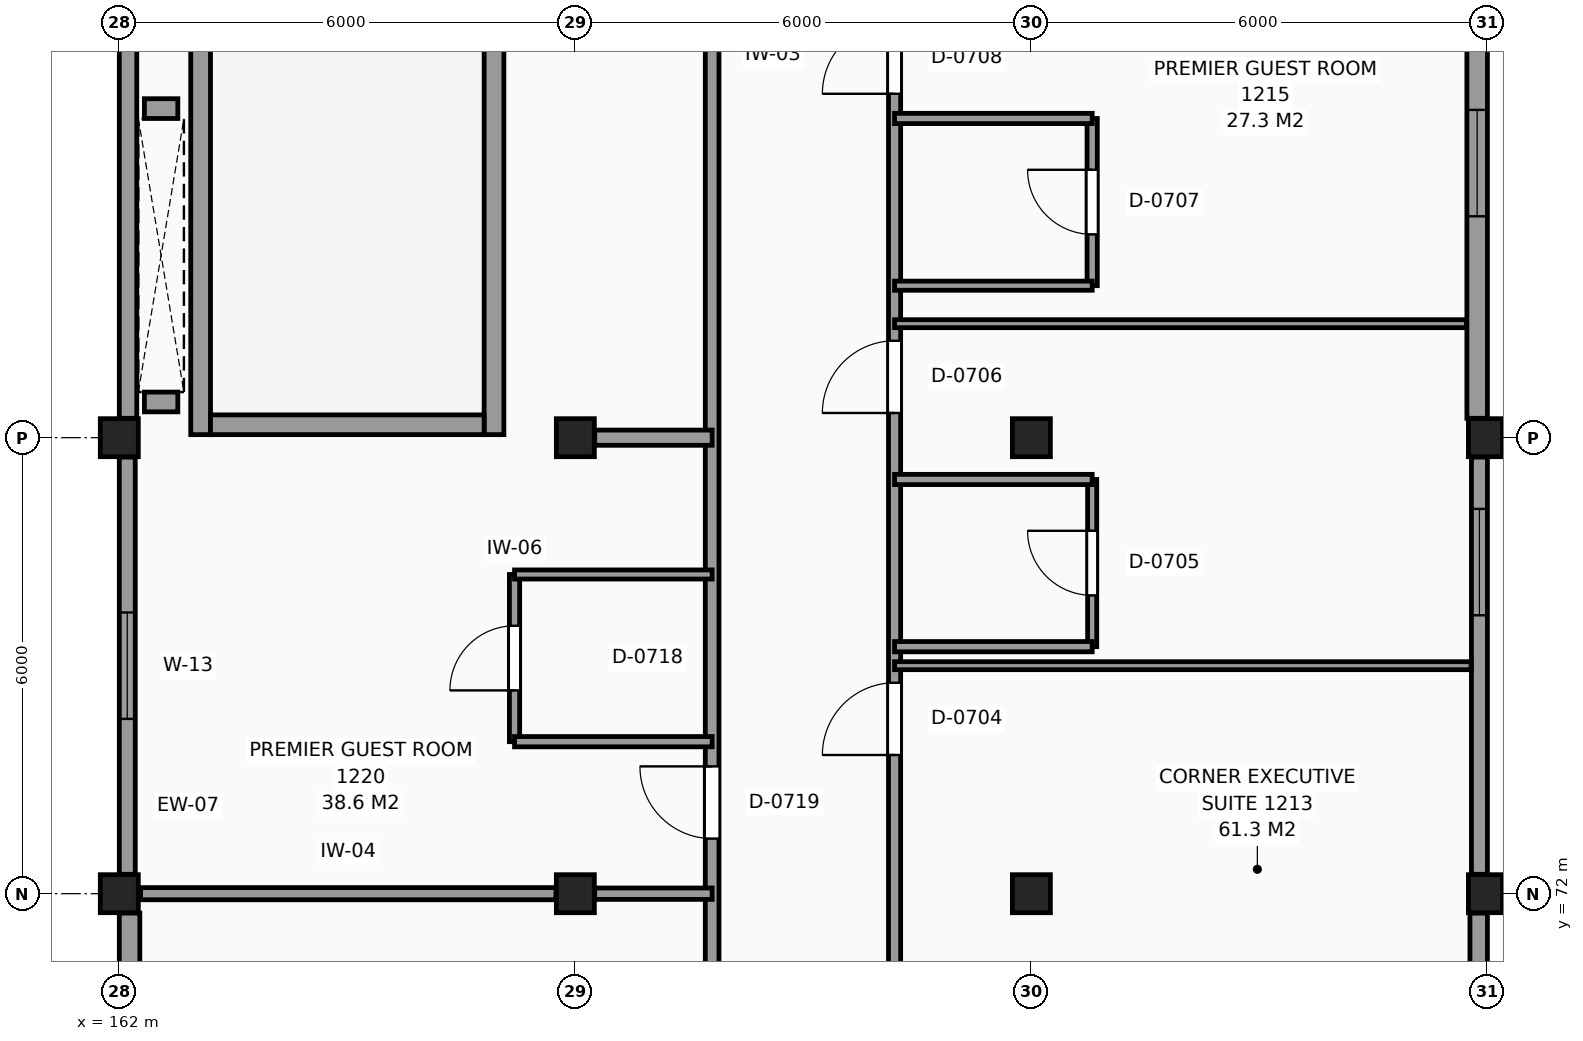
"""IFC4 building model, lengths in metres.
Left out: names, types, materials, properties, quantities, classifications, styles, units other than length and angle.
Written with IfcOpenShell. Run it as: python <this file> out.ifc"""

import sys

from ifc_helpers import new_model, si_unit, direction, frame, frame_2d, origin, origin_2d, place, context, subcontext, project, spatial, rectangle, extrude, element, fill, save


model = new_model("IFC4")
c1 = context("Model", 3, precision=1e-05, world=origin(), true_north=direction((0.0, 1.0)))
c2 = subcontext(c1, "Body", "Model", "MODEL_VIEW")
j1 = project(units=[si_unit("LENGTHUNIT", "METRE"), si_unit("PLANEANGLEUNIT", "RADIAN")], contexts=[c1])
p1 = place(None, origin())
s1 = spatial("IfcSite", under=j1, at=p1, CompositionType="ELEMENT")
p2 = place(p1, origin())
s2 = spatial("IfcBuilding", under=s1, at=p2, CompositionType="ELEMENT")
p3 = place(p2, frame((0.0, 0.0, 48.0)))
s3 = spatial("IfcBuildingStorey", under=s2, at=p3, CompositionType="ELEMENT", Elevation=48.0)
for number, where, z_axis, x_axis in (
    (1, (162.0, 72.0, 0.0), (0.0, 0.0, 1.0), (1.0, 0.0, 0.0)),
    (2, (162.0, 78.0, 0.0), (0.0, 0.0, 1.0), (1.0, 0.0, 0.0)),
    (3, (168.0, 72.0, 0.0), (0.0, 0.0, 1.0), (1.0, 0.0, 0.0)),
    (4, (168.0, 78.0, 0.0), (0.0, 0.0, 1.0), (1.0, 0.0, 0.0)),
    (5, (174.0, 72.0, 0.0), (0.0, 0.0, 1.0), (1.0, 0.0, 0.0)),
    (6, (174.0, 78.0, 0.0), (0.0, 0.0, 1.0), (1.0, 0.0, 0.0)),
    (7, (180.0, 72.0, 0.0), (0.0, 0.0, 1.0), (1.0, 0.0, 0.0)),
    (8, (180.0, 78.0, 0.0), (0.0, 0.0, 1.0), (1.0, 0.0, 0.0)),
):
    element("IfcColumn", number, at=place(p3, frame(where, z_axis=z_axis, x_axis=x_axis)), inside=s3, PredefinedType="COLUMN", context=c2, shape_type="SweptSolid", body=[
        extrude(rectangle(XDim=0.5, YDim=0.5, at=origin_2d()), origin(), (0.0, 0.0, 1.0), 3.3),
    ])
p4 = place(p3, frame((179.885, 66.255, 0.0), z_axis=(0.0, 0.0, 1.0), x_axis=(0.0, 1.0, 0.0)))
e9 = element("IfcWall", 9, at=p4, inside=s3, PredefinedType="SOLIDWALL", context=c2, shape_type="SweptSolid", body=[
    extrude(rectangle(XDim=5.49, YDim=0.23, at=frame_2d((2.745, 0.0))), origin(), (0.0, 0.0, 1.0), 2.4),
])
p5 = place(p4, frame((2.045, 0.0, 0.8)))
e10 = element("IfcOpeningElement", 10, at=p5, cuts=e9, PredefinedType="OPENING", context=c2, shape_type="SweptSolid", body=[
    extrude(rectangle(XDim=1.4, YDim=1.4, at=frame_2d((0.7, 0.7))), frame((0.0, 0.125, 0.0), z_axis=(0.0, -1.0, 0.0), x_axis=(1.0, 0.0, 0.0)), (0.0, 0.0, 1.0), 0.25),
])
p6 = place(p3, frame((179.895, 72.255, 0.0), z_axis=(0.0, 0.0, 1.0), x_axis=(0.0, 1.0, 0.0)))
e11 = element("IfcWall", 11, at=p6, inside=s3, PredefinedType="SOLIDWALL", context=c2, shape_type="SweptSolid", body=[
    extrude(rectangle(XDim=5.49, YDim=0.21, at=frame_2d((2.745, 0.0))), origin(), (0.0, 0.0, 1.0), 2.4),
])
p7 = place(p6, frame((3.408, 0.0, 0.8)))
e12 = element("IfcOpeningElement", 12, at=p7, cuts=e11, PredefinedType="OPENING", context=c2, shape_type="SweptSolid", body=[
    extrude(rectangle(XDim=1.4, YDim=1.4, at=frame_2d((0.7, 0.7))), frame((0.0, 0.115, 0.0), z_axis=(0.0, -1.0, 0.0), x_axis=(1.0, 0.0, 0.0)), (0.0, 0.0, 1.0), 0.23),
])
p8 = place(p3, frame((179.865, 78.255, 0.0), z_axis=(0.0, 0.0, 1.0), x_axis=(0.0, 1.0, 0.0)))
e13 = element("IfcWall", 13, at=p8, inside=s3, PredefinedType="SOLIDWALL", context=c2, shape_type="SweptSolid", body=[
    extrude(rectangle(XDim=5.49, YDim=0.27, at=frame_2d((2.745, 0.0))), origin(), (0.0, 0.0, 1.0), 2.4),
])
p9 = place(p8, frame((2.658, 0.0, 0.8)))
e14 = element("IfcOpeningElement", 14, at=p9, cuts=e13, PredefinedType="OPENING", context=c2, shape_type="SweptSolid", body=[
    extrude(rectangle(XDim=1.4, YDim=1.4, at=frame_2d((0.7, 0.7))), frame((0.0, 0.145, 0.0), z_axis=(0.0, -1.0, 0.0), x_axis=(1.0, 0.0, 0.0)), (0.0, 0.0, 1.0), 0.29),
])
p10 = place(p3, frame((162.115, 83.745, 0.0), z_axis=(0.0, 0.0, 1.0), x_axis=(0.0, -1.0, 0.0)))
e15 = element("IfcWall", 15, at=p10, inside=s3, PredefinedType="SOLIDWALL", context=c2, shape_type="SweptSolid", body=[
    extrude(rectangle(XDim=5.49, YDim=0.23, at=frame_2d((2.745, 0.0))), origin(), (0.0, 0.0, 1.0), 3.05),
])
p11 = place(p3, frame((162.105, 77.745, 0.0), z_axis=(0.0, 0.0, 1.0), x_axis=(0.0, -1.0, 0.0)))
e16 = element("IfcWall", 16, at=p11, inside=s3, PredefinedType="SOLIDWALL", context=c2, shape_type="SweptSolid", body=[
    extrude(rectangle(XDim=5.49, YDim=0.21, at=frame_2d((2.745, 0.0))), origin(), (0.0, 0.0, 1.0), 2.4),
])
p12 = place(p11, frame((2.045, 0.0, 0.8)))
e17 = element("IfcOpeningElement", 17, at=p12, cuts=e16, PredefinedType="OPENING", context=c2, shape_type="SweptSolid", body=[
    extrude(rectangle(XDim=1.4, YDim=1.4, at=frame_2d((0.7, 0.7))), frame((0.0, 0.115, 0.0), z_axis=(0.0, -1.0, 0.0), x_axis=(1.0, 0.0, 0.0)), (0.0, 0.0, 1.0), 0.23),
])
p13 = place(p3, frame((162.135, 71.745, 0.0), z_axis=(0.0, 0.0, 1.0), x_axis=(0.0, -1.0, 0.0)))
e18 = element("IfcWall", 18, at=p13, inside=s3, PredefinedType="SOLIDWALL", context=c2, shape_type="SweptSolid", body=[
    extrude(rectangle(XDim=5.49, YDim=0.27, at=frame_2d((2.745, 0.0))), origin(), (0.0, 0.0, 1.0), 2.4),
])
p14 = place(p13, frame((2.045, 0.0, 0.8)))
e19 = element("IfcOpeningElement", 19, at=p14, cuts=e18, PredefinedType="OPENING", context=c2, shape_type="SweptSolid", body=[
    extrude(rectangle(XDim=1.4, YDim=1.4, at=frame_2d((0.7, 0.7))), frame((0.0, 0.145, 0.0), z_axis=(0.0, -1.0, 0.0), x_axis=(1.0, 0.0, 0.0)), (0.0, 0.0, 1.0), 0.29),
])
for number, where, z_axis, x_axis in (
    (20, (163.07, 78.04, 0.0), (0.0, 0.0, 1.0), (0.0, 1.0, 0.0)),
    (21, (166.93, 78.04, 0.0), (0.0, 0.0, 1.0), (0.0, 1.0, 0.0)),
):
    element("IfcWall", number, at=place(p3, frame(where, z_axis=z_axis, x_axis=x_axis)), inside=s3, PredefinedType="SHEAR", context=c2, shape_type="SweptSolid", body=[
        extrude(rectangle(XDim=10.72, YDim=0.26, at=frame_2d((5.36, 0.0))), origin(), (0.0, 0.0, 1.0), 3.3),
    ])
p15 = place(p3, frame((163.2, 78.17, 0.0), z_axis=(0.0, 0.0, 1.0), x_axis=(1.0, 0.0, 0.0)))
e22 = element("IfcWall", 22, at=p15, inside=s3, PredefinedType="SHEAR", context=c2, shape_type="SweptSolid", body=[
    extrude(rectangle(XDim=3.6, YDim=0.26, at=frame_2d((1.8, 0.0))), origin(), (0.0, 0.0, 1.0), 3.3),
])
for number, where, z_axis, x_axis in (
    (23, (162.33, 78.47, 0.0), (0.0, 0.0, 1.0), (1.0, 0.0, 0.0)),
    (24, (162.33, 82.33, 0.0), (0.0, 0.0, 1.0), (1.0, 0.0, 0.0)),
):
    element("IfcWall", number, at=place(p3, frame(where, z_axis=z_axis, x_axis=x_axis)), inside=s3, PredefinedType="SHEAR", context=c2, shape_type="SweptSolid", body=[
        extrude(rectangle(XDim=0.44, YDim=0.26, at=frame_2d((0.22, 0.0))), origin(), (0.0, 0.0, 1.0), 3.3),
    ])
p16 = place(p3, frame((167.2, 74.0, 0.0), z_axis=(0.0, 0.0, 1.0), x_axis=(0.0, 1.0, 0.0)))
e25 = element("IfcWall", 25, at=p16, inside=s3, PredefinedType="PARTITIONING", context=c2, shape_type="SweptSolid", body=[
    extrude(rectangle(XDim=2.2, YDim=0.135, at=frame_2d((1.1, 0.0))), origin(), (0.0, 0.0, 1.0), 3.05),
])
p17 = place(p16, frame((0.675, 0.0, 0.0)))
e26 = element("IfcOpeningElement", 26, at=p17, cuts=e25, PredefinedType="OPENING", context=c2, shape_type="SweptSolid", body=[
    extrude(rectangle(XDim=0.85, YDim=2.1, at=frame_2d((0.425, 1.05))), frame((0.0, 0.078, 0.0), z_axis=(0.0, -1.0, 0.0), x_axis=(1.0, 0.0, 0.0)), (0.0, 0.0, 1.0), 0.155),
])
p18 = place(p3, frame((169.8, 66.235, 0.0), z_axis=(0.0, 0.0, 1.0), x_axis=(0.0, 1.0, 0.0)))
e27 = element("IfcWall", 27, at=p18, inside=s3, PredefinedType="PARTITIONING", context=c2, shape_type="SweptSolid", body=[
    extrude(rectangle(XDim=41.585, YDim=0.18, at=frame_2d((20.792, 0.0))), origin(), (0.0, 0.0, 1.0), 3.05),
])
p19 = place(p18, frame((26.165, 0.0, 0.0)))
e28 = element("IfcOpeningElement", 28, at=p19, cuts=e27, PredefinedType="OPENING", context=c2, shape_type="SweptSolid", body=[
    extrude(rectangle(XDim=1.2, YDim=2.2, at=frame_2d((0.6, 1.1))), frame((0.0, 0.1, 0.0), z_axis=(0.0, -1.0, 0.0), x_axis=(1.0, 0.0, 0.0)), (0.0, 0.0, 1.0), 0.2),
])
p20 = place(p18, frame((0.44, 0.0, 0.0)))
e29 = element("IfcOpeningElement", 29, at=p20, cuts=e27, PredefinedType="OPENING", context=c2, shape_type="SweptSolid", body=[
    extrude(rectangle(XDim=0.95, YDim=2.1, at=frame_2d((0.475, 1.05))), frame((0.0, 0.1, 0.0), z_axis=(0.0, -1.0, 0.0), x_axis=(1.0, 0.0, 0.0)), (0.0, 0.0, 1.0), 0.2),
])
p21 = place(p18, frame((6.49, 0.0, 0.0)))
e30 = element("IfcOpeningElement", 30, at=p21, cuts=e27, PredefinedType="OPENING", context=c2, shape_type="SweptSolid", body=[
    extrude(rectangle(XDim=0.95, YDim=2.1, at=frame_2d((0.475, 1.05))), frame((0.0, 0.1, 0.0), z_axis=(0.0, -1.0, 0.0), x_axis=(1.0, 0.0, 0.0)), (0.0, 0.0, 1.0), 0.2),
])
p22 = place(p18, frame((30.49, 0.0, 0.0)))
e31 = element("IfcOpeningElement", 31, at=p22, cuts=e27, PredefinedType="OPENING", context=c2, shape_type="SweptSolid", body=[
    extrude(rectangle(XDim=0.95, YDim=2.1, at=frame_2d((0.475, 1.05))), frame((0.0, 0.1, 0.0), z_axis=(0.0, -1.0, 0.0), x_axis=(1.0, 0.0, 0.0)), (0.0, 0.0, 1.0), 0.2),
])
p23 = place(p18, frame((36.49, 0.0, 0.0)))
e32 = element("IfcOpeningElement", 32, at=p23, cuts=e27, PredefinedType="OPENING", context=c2, shape_type="SweptSolid", body=[
    extrude(rectangle(XDim=0.95, YDim=2.1, at=frame_2d((0.475, 1.05))), frame((0.0, 0.1, 0.0), z_axis=(0.0, -1.0, 0.0), x_axis=(1.0, 0.0, 0.0)), (0.0, 0.0, 1.0), 0.2),
])
p24 = place(p3, frame((172.2, 66.235, 0.0), z_axis=(0.0, 0.0, 1.0), x_axis=(0.0, 1.0, 0.0)))
e33 = element("IfcWall", 33, at=p24, inside=s3, PredefinedType="PARTITIONING", context=c2, shape_type="SweptSolid", body=[
    extrude(rectangle(XDim=41.585, YDim=0.16, at=frame_2d((20.792, 0.0))), origin(), (0.0, 0.0, 1.0), 3.05),
])
p25 = place(p24, frame((7.59, 0.0, 0.0)))
e34 = element("IfcOpeningElement", 34, at=p25, cuts=e33, PredefinedType="OPENING", context=c2, shape_type="SweptSolid", body=[
    extrude(rectangle(XDim=0.95, YDim=2.1, at=frame_2d((0.475, 1.05))), frame((0.0, 0.09, 0.0), z_axis=(0.0, -1.0, 0.0), x_axis=(1.0, 0.0, 0.0)), (0.0, 0.0, 1.0), 0.18),
])
p26 = place(p24, frame((12.09, 0.0, 0.0)))
e35 = element("IfcOpeningElement", 35, at=p26, cuts=e33, PredefinedType="OPENING", context=c2, shape_type="SweptSolid", body=[
    extrude(rectangle(XDim=0.95, YDim=2.1, at=frame_2d((0.475, 1.05))), frame((0.0, 0.09, 0.0), z_axis=(0.0, -1.0, 0.0), x_axis=(1.0, 0.0, 0.0)), (0.0, 0.0, 1.0), 0.18),
])
p27 = place(p24, frame((16.29, 0.0, 0.0)))
e36 = element("IfcOpeningElement", 36, at=p27, cuts=e33, PredefinedType="OPENING", context=c2, shape_type="SweptSolid", body=[
    extrude(rectangle(XDim=0.95, YDim=2.1, at=frame_2d((0.475, 1.05))), frame((0.0, 0.09, 0.0), z_axis=(0.0, -1.0, 0.0), x_axis=(1.0, 0.0, 0.0)), (0.0, 0.0, 1.0), 0.18),
])
p28 = place(p24, frame((18.49, 0.0, 0.0)))
e37 = element("IfcOpeningElement", 37, at=p28, cuts=e33, PredefinedType="OPENING", context=c2, shape_type="SweptSolid", body=[
    extrude(rectangle(XDim=0.95, YDim=2.1, at=frame_2d((0.475, 1.05))), frame((0.0, 0.09, 0.0), z_axis=(0.0, -1.0, 0.0), x_axis=(1.0, 0.0, 0.0)), (0.0, 0.0, 1.0), 0.18),
])
p29 = place(p24, frame((24.49, 0.0, 0.0)))
e38 = element("IfcOpeningElement", 38, at=p29, cuts=e33, PredefinedType="OPENING", context=c2, shape_type="SweptSolid", body=[
    extrude(rectangle(XDim=0.95, YDim=2.1, at=frame_2d((0.475, 1.05))), frame((0.0, 0.09, 0.0), z_axis=(0.0, -1.0, 0.0), x_axis=(1.0, 0.0, 0.0)), (0.0, 0.0, 1.0), 0.18),
])
p30 = place(p24, frame((38.34, 0.0, 0.0)))
e39 = element("IfcOpeningElement", 39, at=p30, cuts=e33, PredefinedType="OPENING", context=c2, shape_type="SweptSolid", body=[
    extrude(rectangle(XDim=0.95, YDim=2.1, at=frame_2d((0.475, 1.05))), frame((0.0, 0.09, 0.0), z_axis=(0.0, -1.0, 0.0), x_axis=(1.0, 0.0, 0.0)), (0.0, 0.0, 1.0), 0.18),
])
p31 = place(p3, frame((174.8, 75.25, 0.0), z_axis=(0.0, 0.0, 1.0), x_axis=(0.0, 1.0, 0.0)))
e40 = element("IfcWall", 40, at=p31, inside=s3, PredefinedType="PARTITIONING", context=c2, shape_type="SweptSolid", body=[
    extrude(rectangle(XDim=2.2, YDim=0.12, at=frame_2d((1.1, 0.0))), origin(), (0.0, 0.0, 1.0), 3.05),
])
p32 = place(p31, frame((0.675, 0.0, 0.0)))
e41 = element("IfcOpeningElement", 41, at=p32, cuts=e40, PredefinedType="OPENING", context=c2, shape_type="SweptSolid", body=[
    extrude(rectangle(XDim=0.85, YDim=2.1, at=frame_2d((0.425, 1.05))), frame((0.0, 0.07, 0.0), z_axis=(0.0, -1.0, 0.0), x_axis=(1.0, 0.0, 0.0)), (0.0, 0.0, 1.0), 0.14),
])
p33 = place(p3, frame((174.8, 80.0, 0.0), z_axis=(0.0, 0.0, 1.0), x_axis=(0.0, 1.0, 0.0)))
e42 = element("IfcWall", 42, at=p33, inside=s3, PredefinedType="PARTITIONING", context=c2, shape_type="SweptSolid", body=[
    extrude(rectangle(XDim=2.2, YDim=0.135, at=frame_2d((1.1, 0.0))), origin(), (0.0, 0.0, 1.0), 3.05),
])
p34 = place(p33, frame((0.675, 0.0, 0.0)))
e43 = element("IfcOpeningElement", 43, at=p34, cuts=e42, PredefinedType="OPENING", context=c2, shape_type="SweptSolid", body=[
    extrude(rectangle(XDim=0.85, YDim=2.1, at=frame_2d((0.425, 1.05))), frame((0.0, 0.078, 0.0), z_axis=(0.0, -1.0, 0.0), x_axis=(1.0, 0.0, 0.0)), (0.0, 0.0, 1.0), 0.155),
])
p35 = place(p3, frame((162.28, 72.0, 0.0), z_axis=(0.0, 0.0, 1.0), x_axis=(1.0, 0.0, 0.0)))
e44 = element("IfcWall", 44, at=p35, inside=s3, PredefinedType="PARTITIONING", context=c2, shape_type="SweptSolid", body=[
    extrude(rectangle(XDim=5.465, YDim=0.16, at=frame_2d((2.732, 0.0))), origin(), (0.0, 0.0, 1.0), 2.25),
])
p36 = place(p3, frame((168.255, 72.0, 0.0), z_axis=(0.0, 0.0, 1.0), x_axis=(1.0, 0.0, 0.0)))
e45 = element("IfcWall", 45, at=p36, inside=s3, PredefinedType="PARTITIONING", context=c2, shape_type="SweptSolid", body=[
    extrude(rectangle(XDim=1.545, YDim=0.15, at=frame_2d((0.772, 0.0))), origin(), (0.0, 0.0, 1.0), 2.25),
])
p37 = place(p3, frame((167.2, 74.0, 0.0), z_axis=(0.0, 0.0, 1.0), x_axis=(1.0, 0.0, 0.0)))
e46 = element("IfcWall", 46, at=p37, inside=s3, PredefinedType="PARTITIONING", context=c2, shape_type="SweptSolid", body=[
    extrude(rectangle(XDim=2.6, YDim=0.135, at=frame_2d((1.3, 0.0))), origin(), (0.0, 0.0, 1.0), 3.05),
])
p38 = place(p3, frame((172.2, 75.0, 0.0), z_axis=(0.0, 0.0, 1.0), x_axis=(1.0, 0.0, 0.0)))
e47 = element("IfcWall", 47, at=p38, inside=s3, PredefinedType="PARTITIONING", context=c2, shape_type="SweptSolid", body=[
    extrude(rectangle(XDim=7.585, YDim=0.105, at=frame_2d((3.792, 0.0))), origin(), (0.0, 0.0, 1.0), 3.05),
])
p39 = place(p3, frame((172.2, 75.25, 0.0), z_axis=(0.0, 0.0, 1.0), x_axis=(1.0, 0.0, 0.0)))
e48 = element("IfcWall", 48, at=p39, inside=s3, PredefinedType="PARTITIONING", context=c2, shape_type="SweptSolid", body=[
    extrude(rectangle(XDim=2.6, YDim=0.135, at=frame_2d((1.3, 0.0))), origin(), (0.0, 0.0, 1.0), 3.05),
])
p40 = place(p3, frame((167.2, 76.2, 0.0), z_axis=(0.0, 0.0, 1.0), x_axis=(1.0, 0.0, 0.0)))
e49 = element("IfcWall", 49, at=p40, inside=s3, PredefinedType="PARTITIONING", context=c2, shape_type="SweptSolid", body=[
    extrude(rectangle(XDim=2.6, YDim=0.12, at=frame_2d((1.3, 0.0))), origin(), (0.0, 0.0, 1.0), 3.05),
])
p41 = place(p3, frame((172.2, 77.45, 0.0), z_axis=(0.0, 0.0, 1.0), x_axis=(1.0, 0.0, 0.0)))
e50 = element("IfcWall", 50, at=p41, inside=s3, PredefinedType="PARTITIONING", context=c2, shape_type="SweptSolid", body=[
    extrude(rectangle(XDim=2.6, YDim=0.135, at=frame_2d((1.3, 0.0))), origin(), (0.0, 0.0, 1.0), 3.05),
])
p42 = place(p3, frame((168.255, 78.0, 0.0), z_axis=(0.0, 0.0, 1.0), x_axis=(1.0, 0.0, 0.0)))
e51 = element("IfcWall", 51, at=p42, inside=s3, PredefinedType="PARTITIONING", context=c2, shape_type="SweptSolid", body=[
    extrude(rectangle(XDim=1.545, YDim=0.2, at=frame_2d((0.772, 0.0))), origin(), (0.0, 0.0, 1.0), 2.25),
])
p43 = place(p3, frame((172.2, 79.5, 0.0), z_axis=(0.0, 0.0, 1.0), x_axis=(1.0, 0.0, 0.0)))
e52 = element("IfcWall", 52, at=p43, inside=s3, PredefinedType="PARTITIONING", context=c2, shape_type="SweptSolid", body=[
    extrude(rectangle(XDim=7.525, YDim=0.105, at=frame_2d((3.763, 0.0))), origin(), (0.0, 0.0, 1.0), 3.05),
])
p44 = place(p3, frame((172.2, 80.0, 0.0), z_axis=(0.0, 0.0, 1.0), x_axis=(1.0, 0.0, 0.0)))
e53 = element("IfcWall", 53, at=p44, inside=s3, PredefinedType="PARTITIONING", context=c2, shape_type="SweptSolid", body=[
    extrude(rectangle(XDim=2.6, YDim=0.12, at=frame_2d((1.3, 0.0))), origin(), (0.0, 0.0, 1.0), 3.05),
])
p45 = place(p3, frame((172.2, 82.2, 0.0), z_axis=(0.0, 0.0, 1.0), x_axis=(1.0, 0.0, 0.0)))
e54 = element("IfcWall", 54, at=p45, inside=s3, PredefinedType="PARTITIONING", context=c2, shape_type="SweptSolid", body=[
    extrude(rectangle(XDim=2.6, YDim=0.135, at=frame_2d((1.3, 0.0))), origin(), (0.0, 0.0, 1.0), 3.05),
])
p46 = place(p7, origin())
e55 = element("IfcWindow", 55, at=p46, inside=s3, PartitioningType="SINGLE_PANEL", PredefinedType="WINDOW", context=c2, shape_type="SweptSolid", body=[
    extrude(rectangle(XDim=1.4, YDim=1.4, at=frame_2d((0.7, 0.7))), frame((0.0, 0.03, 0.0), z_axis=(0.0, -1.0, 0.0), x_axis=(1.0, 0.0, 0.0)), (0.0, 0.0, 1.0), 0.06),
])
fill(e12, e55)
p47 = place(p9, origin())
e56 = element("IfcWindow", 56, at=p47, inside=s3, PartitioningType="SINGLE_PANEL", PredefinedType="WINDOW", context=c2, shape_type="SweptSolid", body=[
    extrude(rectangle(XDim=1.4, YDim=1.4, at=frame_2d((0.7, 0.7))), frame((0.0, 0.03, 0.0), z_axis=(0.0, -1.0, 0.0), x_axis=(1.0, 0.0, 0.0)), (0.0, 0.0, 1.0), 0.06),
])
fill(e14, e56)
p48 = place(p12, origin())
e57 = element("IfcWindow", 57, at=p48, inside=s3, PartitioningType="SINGLE_PANEL", PredefinedType="WINDOW", context=c2, shape_type="SweptSolid", body=[
    extrude(rectangle(XDim=1.4, YDim=1.4, at=frame_2d((0.7, 0.7))), frame((0.0, 0.03, 0.0), z_axis=(0.0, -1.0, 0.0), x_axis=(1.0, 0.0, 0.0)), (0.0, 0.0, 1.0), 0.06),
])
fill(e17, e57)
p49 = place(p25, origin())
e58 = element("IfcDoor", 58, at=p49, inside=s3, OperationType="SINGLE_SWING_LEFT", PredefinedType="DOOR", context=c2, shape_type="SweptSolid", body=[
    extrude(rectangle(XDim=0.95, YDim=2.1, at=frame_2d((0.475, 1.05))), frame((0.0, 0.025, 0.0), z_axis=(0.0, -1.0, 0.0), x_axis=(1.0, 0.0, 0.0)), (0.0, 0.0, 1.0), 0.05),
])
fill(e34, e58)
p50 = place(p32, origin())
e59 = element("IfcDoor", 59, at=p50, inside=s3, OperationType="SINGLE_SWING_RIGHT", PredefinedType="DOOR", context=c2, shape_type="SweptSolid", body=[
    extrude(rectangle(XDim=0.85, YDim=2.1, at=frame_2d((0.425, 1.05))), frame((0.0, 0.025, 0.0), z_axis=(0.0, -1.0, 0.0), x_axis=(1.0, 0.0, 0.0)), (0.0, 0.0, 1.0), 0.05),
])
fill(e41, e59)
p51 = place(p26, origin())
e60 = element("IfcDoor", 60, at=p51, inside=s3, OperationType="SINGLE_SWING_LEFT", PredefinedType="DOOR", context=c2, shape_type="SweptSolid", body=[
    extrude(rectangle(XDim=0.95, YDim=2.1, at=frame_2d((0.475, 1.05))), frame((0.0, 0.025, 0.0), z_axis=(0.0, -1.0, 0.0), x_axis=(1.0, 0.0, 0.0)), (0.0, 0.0, 1.0), 0.05),
])
fill(e35, e60)
p52 = place(p34, origin())
e61 = element("IfcDoor", 61, at=p52, inside=s3, OperationType="SINGLE_SWING_RIGHT", PredefinedType="DOOR", context=c2, shape_type="SweptSolid", body=[
    extrude(rectangle(XDim=0.85, YDim=2.1, at=frame_2d((0.425, 1.05))), frame((0.0, 0.025, 0.0), z_axis=(0.0, -1.0, 0.0), x_axis=(1.0, 0.0, 0.0)), (0.0, 0.0, 1.0), 0.05),
])
fill(e43, e61)
p53 = place(p27, origin())
e62 = element("IfcDoor", 62, at=p53, inside=s3, OperationType="SINGLE_SWING_LEFT", PredefinedType="DOOR", context=c2, shape_type="SweptSolid", body=[
    extrude(rectangle(XDim=0.95, YDim=2.1, at=frame_2d((0.475, 1.05))), frame((0.0, 0.025, 0.0), z_axis=(0.0, -1.0, 0.0), x_axis=(1.0, 0.0, 0.0)), (0.0, 0.0, 1.0), 0.05),
])
fill(e36, e62)
p54 = place(p17, origin())
e63 = element("IfcDoor", 63, at=p54, inside=s3, OperationType="SINGLE_SWING_LEFT", PredefinedType="DOOR", context=c2, shape_type="SweptSolid", body=[
    extrude(rectangle(XDim=0.85, YDim=2.1, at=frame_2d((0.425, 1.05))), frame((0.0, 0.025, 0.0), z_axis=(0.0, -1.0, 0.0), x_axis=(1.0, 0.0, 0.0)), (0.0, 0.0, 1.0), 0.05),
])
fill(e26, e63)
p55 = place(p21, origin())
e64 = element("IfcDoor", 64, at=p55, inside=s3, OperationType="SINGLE_SWING_RIGHT", PredefinedType="DOOR", context=c2, shape_type="SweptSolid", body=[
    extrude(rectangle(XDim=0.95, YDim=2.1, at=frame_2d((0.475, 1.05))), frame((0.0, 0.025, 0.0), z_axis=(0.0, -1.0, 0.0), x_axis=(1.0, 0.0, 0.0)), (0.0, 0.0, 1.0), 0.05),
])
fill(e30, e64)
save(model, sys.argv[1])
